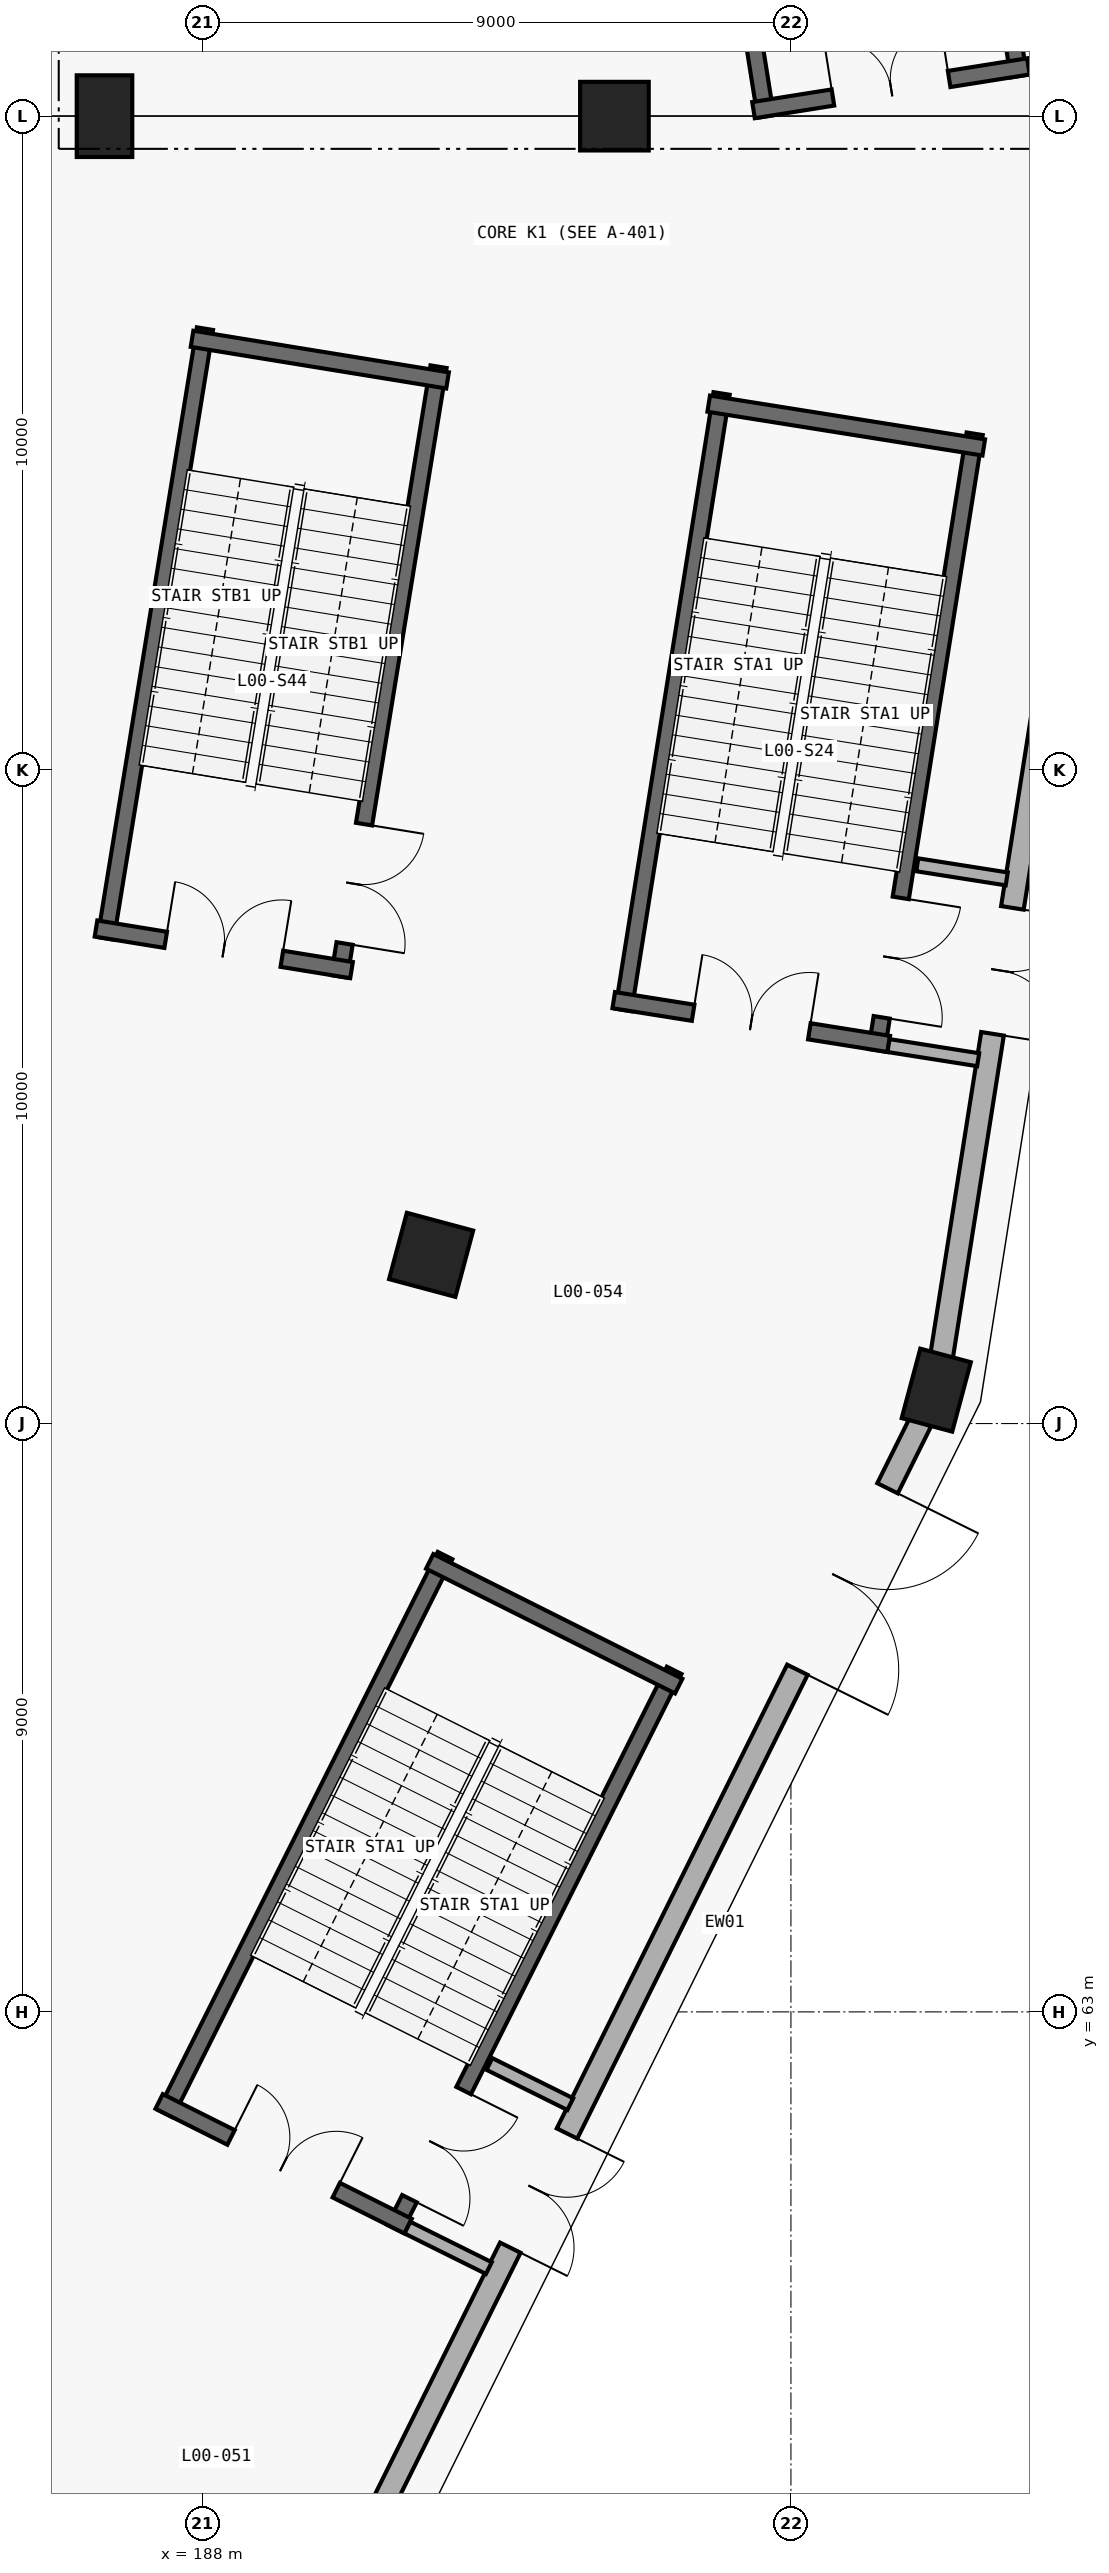
"""IFC4 building model, lengths in metres.
Left out: names, types, materials, properties, quantities, classifications, styles, units other than length and angle.
Written with IfcOpenShell. Run it as: python <this file> out.ifc"""

import sys

from ifc_helpers import new_model, si_unit, direction, frame, frame_2d, origin, origin_2d, place, context, subcontext, project, spatial, rectangle, extrude, element, fill, save


model = new_model("IFC4")
c1 = context("Model", 3, precision=1e-05, world=origin(), true_north=direction((0.0, 1.0)))
c2 = subcontext(c1, "Body", "Model", "MODEL_VIEW")
j1 = project(units=[si_unit("LENGTHUNIT", "METRE"), si_unit("PLANEANGLEUNIT", "RADIAN")], contexts=[c1])
p1 = place(None, origin())
s1 = spatial("IfcSite", under=j1, at=p1, CompositionType="ELEMENT")
p2 = place(p1, origin())
s2 = spatial("IfcBuilding", under=s1, at=p2, CompositionType="ELEMENT")
p3 = place(p2, origin())
s3 = spatial("IfcBuildingStorey", under=s2, at=p3, CompositionType="ELEMENT", Elevation=0.0)
p4 = place(p3, frame((186.5, 92.0, 0.0), z_axis=(0.0, 0.0, 1.0), x_axis=(1.0, 0.0, 0.0)))
e1 = element("IfcColumn", 1, at=p4, inside=s3, PredefinedType="COLUMN", context=c2, shape_type="SweptSolid", body=[
    extrude(rectangle(XDim=0.85, YDim=1.25, at=origin_2d()), origin(), (0.0, 0.0, 1.0), 5.4),
])
p5 = place(p3, frame((194.3, 92.0, 0.0), z_axis=(0.0, 0.0, 1.0), x_axis=(1.0, 0.0, 0.0)))
e2 = element("IfcColumn", 2, at=p5, inside=s3, PredefinedType="COLUMN", context=c2, shape_type="SweptSolid", body=[
    extrude(rectangle(XDim=1.05, YDim=1.05, at=origin_2d()), origin(), (0.0, 0.0, 1.0), 5.4),
])
p6 = place(p3, frame((199.223, 72.511, 0.0), z_axis=(0.0, 0.0, 1.0), x_axis=(-0.965925826289, 0.258819045103, 0.0)))
e3 = element("IfcColumn", 3, at=p6, inside=s3, PredefinedType="COLUMN", context=c2, shape_type="SweptSolid", body=[
    extrude(rectangle(XDim=0.8, YDim=1.1, at=origin_2d()), origin(), (0.0, 0.0, 1.0), 5.4),
])
p7 = place(p3, frame((191.496, 74.581, 0.0), z_axis=(0.0, 0.0, 1.0), x_axis=(-0.965925826289, 0.258819045103, 0.0)))
e4 = element("IfcColumn", 4, at=p7, inside=s3, PredefinedType="COLUMN", context=c2, shape_type="SweptSolid", body=[
    extrude(rectangle(XDim=1.05, YDim=1.05, at=origin_2d()), origin(), (0.0, 0.0, 1.0), 5.4),
])
p8 = place(p3, frame((199.305, 110.967, 0.0), z_axis=(0.0, 0.0, 1.0), x_axis=(0.155972645656, -0.987761374932, 0.0)))
e5 = element("IfcWall", 5, at=p8, inside=s3, PredefinedType="STANDARD", context=c2, shape_type="SweptSolid", body=[
    extrude(rectangle(XDim=18.671, YDim=0.35, at=frame_2d((9.335, 0.0))), origin(), (0.0, 0.0, 1.0), 4.165),
])
p9 = place(p8, frame((15.84, 0.0, 0.0)))
e6 = element("IfcOpeningElement", 6, at=p9, cuts=e5, PredefinedType="OPENING", context=c2, shape_type="SweptSolid", body=[
    extrude(rectangle(XDim=1.95, YDim=2.25, at=frame_2d((0.975, 1.125))), frame((0.0, 0.185, 0.0), z_axis=(0.0, -1.0, 0.0), x_axis=(1.0, 0.0, 0.0)), (0.0, 0.0, 1.0), 0.37),
])
p10 = place(p8, frame((2.681, 0.0, 0.0)))
e7 = element("IfcOpeningElement", 7, at=p10, cuts=e5, PredefinedType="OPENING", context=c2, shape_type="SweptSolid", body=[
    extrude(rectangle(XDim=3.6, YDim=2.7, at=frame_2d((1.8, 1.35))), frame((0.0, 0.185, 0.0), z_axis=(0.0, -1.0, 0.0), x_axis=(1.0, 0.0, 0.0)), (0.0, 0.0, 1.0), 0.37),
])
p11 = place(p3, frame((198.985, 72.031, 0.0), z_axis=(0.0, 0.0, 1.0), x_axis=(-0.444884558919, -0.895587923788, 0.0)))
e8 = element("IfcWall", 8, at=p11, inside=s3, PredefinedType="STANDARD", context=c2, shape_type="SweptSolid", body=[
    extrude(rectangle(XDim=19.216, YDim=0.35, at=frame_2d((9.608, 0.0))), origin(), (0.0, 0.0, 1.0), 4.165),
])
p12 = place(p11, frame((12.161, 0.0, 0.0)))
e9 = element("IfcOpeningElement", 9, at=p12, cuts=e8, PredefinedType="OPENING", context=c2, shape_type="SweptSolid", body=[
    extrude(rectangle(XDim=1.95, YDim=2.25, at=frame_2d((0.975, 1.125))), frame((0.0, 0.185, 0.0), z_axis=(0.0, -1.0, 0.0), x_axis=(1.0, 0.0, 0.0)), (0.0, 0.0, 1.0), 0.37),
])
p13 = place(p11, frame((1.14, 0.0, 0.0)))
e10 = element("IfcOpeningElement", 10, at=p13, cuts=e8, PredefinedType="OPENING", context=c2, shape_type="SweptSolid", body=[
    extrude(rectangle(XDim=3.1, YDim=2.58, at=frame_2d((1.55, 1.29))), frame((0.0, 0.185, 0.0), z_axis=(0.0, -1.0, 0.0), x_axis=(1.0, 0.0, 0.0)), (0.0, 0.0, 1.0), 0.37),
])
p14 = place(p3, frame((202.217, 91.475, 0.0), z_axis=(0.0, 0.0, 1.0), x_axis=(-0.155972645656, -0.987761374932, 0.0)))
e11 = element("IfcWall", 11, at=p14, inside=s3, PredefinedType="STANDARD", context=c2, shape_type="SweptSolid", body=[
    extrude(rectangle(XDim=18.671, YDim=0.35, at=frame_2d((9.335, 0.0))), origin(), (0.0, 0.0, 1.0), 4.165),
])
p15 = place(p14, frame((11.73, 0.0, 0.0)))
e12 = element("IfcOpeningElement", 12, at=p15, cuts=e11, PredefinedType="OPENING", context=c2, shape_type="SweptSolid", body=[
    extrude(rectangle(XDim=1.95, YDim=2.25, at=frame_2d((0.975, 1.125))), frame((0.0, 0.185, 0.0), z_axis=(0.0, -1.0, 0.0), x_axis=(1.0, 0.0, 0.0)), (0.0, 0.0, 1.0), 0.37),
])
p16 = place(p14, frame((1.164, 0.0, 0.0)))
e13 = element("IfcOpeningElement", 13, at=p16, cuts=e11, PredefinedType="OPENING", context=c2, shape_type="SweptSolid", body=[
    extrude(rectangle(XDim=2.9, YDim=2.52, at=frame_2d((1.45, 1.26))), frame((0.0, 0.185, 0.0), z_axis=(0.0, -1.0, 0.0), x_axis=(1.0, 0.0, 0.0)), (0.0, 0.0, 1.0), 0.37),
])
p17 = place(p3, frame((198.984, 102.043, 0.0), z_axis=(0.0, 0.0, 1.0), x_axis=(0.157268610044, -0.987555863886, 0.0)))
e14 = element("IfcWall", 14, at=p17, inside=s3, PredefinedType="SHEAR", context=c2, shape_type="SweptSolid", body=[
    extrude(rectangle(XDim=9.55, YDim=0.25, at=frame_2d((4.775, 0.0))), origin(), (0.0, 0.0, 1.0), 5.1),
])
p18 = place(p17, frame((7.19, 0.0, 0.0)))
e15 = element("IfcOpeningElement", 15, at=p18, cuts=e14, PredefinedType="OPENING", context=c2, shape_type="SweptSolid", body=[
    extrude(rectangle(XDim=1.85, YDim=2.3, at=frame_2d((0.925, 1.15))), frame((0.0, 0.135, 0.0), z_axis=(0.0, -1.0, 0.0), x_axis=(1.0, 0.0, 0.0)), (0.0, 0.0, 1.0), 0.27),
])
p19 = place(p3, frame((195.113, 101.427, 0.0), z_axis=(0.0, 0.0, 1.0), x_axis=(0.157243678356, -0.987559833943, 0.0)))
e16 = element("IfcWall", 16, at=p19, inside=s3, PredefinedType="SHEAR", context=c2, shape_type="SweptSolid", body=[
    extrude(rectangle(XDim=9.55, YDim=0.25, at=frame_2d((4.775, 0.0))), origin(), (0.0, 0.0, 1.0), 5.1),
])
p20 = place(p3, frame((196.427, 92.092, 0.0), z_axis=(0.0, 0.0, 1.0), x_axis=(0.987557660991, 0.157257324847, 0.0)))
e17 = element("IfcWall", 17, at=p20, inside=s3, PredefinedType="SHEAR", context=c2, shape_type="SweptSolid", body=[
    extrude(rectangle(XDim=4.26, YDim=0.25, at=frame_2d((2.13, 0.0))), origin(), (0.0, 0.0, 1.0), 5.1),
])
p21 = place(p20, frame((1.23, 0.0, 0.0)))
e18 = element("IfcOpeningElement", 18, at=p21, cuts=e17, PredefinedType="OPENING", context=c2, shape_type="SweptSolid", body=[
    extrude(rectangle(XDim=1.8, YDim=2.25, at=frame_2d((0.9, 1.125))), frame((0.0, 0.135, 0.0), z_axis=(0.0, -1.0, 0.0), x_axis=(1.0, 0.0, 0.0)), (0.0, 0.0, 1.0), 0.27),
])
p22 = place(p3, frame((195.214, 68.225, 0.0), z_axis=(0.0, 0.0, 1.0), x_axis=(-0.447919041961, -0.894074119885, 0.0)))
e19 = element("IfcWall", 19, at=p22, inside=s3, PredefinedType="SHEAR", context=c2, shape_type="SweptSolid", body=[
    extrude(rectangle(XDim=9.55, YDim=0.25, at=frame_2d((4.775, 0.0))), origin(), (0.0, 0.0, 1.0), 5.1),
])
p23 = place(p22, frame((7.19, 0.0, 0.0)))
e20 = element("IfcOpeningElement", 20, at=p23, cuts=e19, PredefinedType="OPENING", context=c2, shape_type="SweptSolid", body=[
    extrude(rectangle(XDim=1.85, YDim=2.3, at=frame_2d((0.925, 1.15))), frame((0.0, 0.135, 0.0), z_axis=(0.0, -1.0, 0.0), x_axis=(1.0, 0.0, 0.0)), (0.0, 0.0, 1.0), 0.27),
])
p24 = place(p3, frame((191.709, 69.981, 0.0), z_axis=(0.0, 0.0, 1.0), x_axis=(-0.4479088042, -0.894079248792, 0.0)))
e21 = element("IfcWall", 21, at=p24, inside=s3, PredefinedType="SHEAR", context=c2, shape_type="SweptSolid", body=[
    extrude(rectangle(XDim=9.55, YDim=0.25, at=frame_2d((4.775, 0.0))), origin(), (0.0, 0.0, 1.0), 5.1),
])
p25 = place(p3, frame((187.336, 61.63, 0.0), z_axis=(0.0, 0.0, 1.0), x_axis=(0.894071595331, -0.447924081092, 0.0)))
e22 = element("IfcWall", 22, at=p25, inside=s3, PredefinedType="SHEAR", context=c2, shape_type="SweptSolid", body=[
    extrude(rectangle(XDim=4.26, YDim=0.25, at=frame_2d((2.13, 0.0))), origin(), (0.0, 0.0, 1.0), 5.1),
])
p26 = place(p25, frame((1.23, 0.0, 0.0)))
e23 = element("IfcOpeningElement", 23, at=p26, cuts=e22, PredefinedType="OPENING", context=c2, shape_type="SweptSolid", body=[
    extrude(rectangle(XDim=1.8, YDim=2.25, at=frame_2d((0.9, 1.125))), frame((0.0, 0.135, 0.0), z_axis=(0.0, -1.0, 0.0), x_axis=(1.0, 0.0, 0.0)), (0.0, 0.0, 1.0), 0.27),
])
p27 = place(p3, frame((195.283, 67.984, 0.0), z_axis=(0.0, 0.0, 1.0), x_axis=(-0.894083048484, 0.447901219481, 0.0)))
e24 = element("IfcWall", 24, at=p27, inside=s3, PredefinedType="SHEAR", context=c2, shape_type="SweptSolid", body=[
    extrude(rectangle(XDim=4.26, YDim=0.25, at=frame_2d((2.13, 0.0))), origin(), (0.0, 0.0, 1.0), 5.1),
])
p28 = place(p3, frame((199.811, 87.142, 0.0), z_axis=(0.0, 0.0, 1.0), x_axis=(-0.157272580499, -0.987555231581, 0.0)))
e25 = element("IfcWall", 25, at=p28, inside=s3, PredefinedType="SHEAR", context=c2, shape_type="SweptSolid", body=[
    extrude(rectangle(XDim=9.55, YDim=0.25, at=frame_2d((4.775, 0.0))), origin(), (0.0, 0.0, 1.0), 5.1),
])
p29 = place(p28, frame((7.19, 0.0, 0.0)))
e26 = element("IfcOpeningElement", 26, at=p29, cuts=e25, PredefinedType="OPENING", context=c2, shape_type="SweptSolid", body=[
    extrude(rectangle(XDim=1.85, YDim=2.3, at=frame_2d((0.925, 1.15))), frame((0.0, 0.135, 0.0), z_axis=(0.0, -1.0, 0.0), x_axis=(1.0, 0.0, 0.0)), (0.0, 0.0, 1.0), 0.27),
])
p30 = place(p3, frame((195.939, 87.758, 0.0), z_axis=(0.0, 0.0, 1.0), x_axis=(-0.157247648214, -0.987559201836, 0.0)))
e27 = element("IfcWall", 27, at=p30, inside=s3, PredefinedType="SHEAR", context=c2, shape_type="SweptSolid", body=[
    extrude(rectangle(XDim=9.55, YDim=0.25, at=frame_2d((4.775, 0.0))), origin(), (0.0, 0.0, 1.0), 5.1),
])
p31 = place(p3, frame((194.289, 78.477, 0.0), z_axis=(0.0, 0.0, 1.0), x_axis=(0.987548759282, -0.157313216355, 0.0)))
e28 = element("IfcWall", 28, at=p31, inside=s3, PredefinedType="SHEAR", context=c2, shape_type="SweptSolid", body=[
    extrude(rectangle(XDim=4.26, YDim=0.25, at=frame_2d((2.13, 0.0))), origin(), (0.0, 0.0, 1.0), 5.1),
])
p32 = place(p31, frame((1.23, 0.0, 0.0)))
e29 = element("IfcOpeningElement", 29, at=p32, cuts=e28, PredefinedType="OPENING", context=c2, shape_type="SweptSolid", body=[
    extrude(rectangle(XDim=1.8, YDim=2.25, at=frame_2d((0.9, 1.125))), frame((0.0, 0.135, 0.0), z_axis=(0.0, -1.0, 0.0), x_axis=(1.0, 0.0, 0.0)), (0.0, 0.0, 1.0), 0.27),
])
p33 = place(p3, frame((199.949, 86.932, 0.0), z_axis=(0.0, 0.0, 1.0), x_axis=(-0.987556243614, 0.157266225551, 0.0)))
e30 = element("IfcWall", 30, at=p33, inside=s3, PredefinedType="SHEAR", context=c2, shape_type="SweptSolid", body=[
    extrude(rectangle(XDim=4.26, YDim=0.25, at=frame_2d((2.13, 0.0))), origin(), (0.0, 0.0, 1.0), 5.1),
])
p34 = place(p3, frame((191.609, 88.167, 0.0), z_axis=(0.0, 0.0, 1.0), x_axis=(-0.160694331821, -0.987004220721, 0.0)))
e31 = element("IfcWall", 31, at=p34, inside=s3, PredefinedType="SHEAR", context=c2, shape_type="SweptSolid", body=[
    extrude(rectangle(XDim=9.45, YDim=0.25, at=frame_2d((4.725, 0.0))), origin(), (0.0, 0.0, 1.0), 5.1),
])
p35 = place(p34, frame((7.09, 0.0, 0.0)))
e32 = element("IfcOpeningElement", 32, at=p35, cuts=e31, PredefinedType="OPENING", context=c2, shape_type="SweptSolid", body=[
    extrude(rectangle(XDim=1.85, YDim=2.3, at=frame_2d((0.925, 1.15))), frame((0.0, 0.135, 0.0), z_axis=(0.0, -1.0, 0.0), x_axis=(1.0, 0.0, 0.0)), (0.0, 0.0, 1.0), 0.27),
])
p36 = place(p3, frame((188.037, 88.749, 0.0), z_axis=(0.0, 0.0, 1.0), x_axis=(-0.160719499634, -0.987000122815, 0.0)))
e33 = element("IfcWall", 33, at=p36, inside=s3, PredefinedType="SHEAR", context=c2, shape_type="SweptSolid", body=[
    extrude(rectangle(XDim=9.45, YDim=0.25, at=frame_2d((4.725, 0.0))), origin(), (0.0, 0.0, 1.0), 5.1),
])
p37 = place(p3, frame((186.37, 79.573, 0.0), z_axis=(0.0, 0.0, 1.0), x_axis=(0.987008406822, -0.160668618163, 0.0)))
e34 = element("IfcWall", 34, at=p37, inside=s3, PredefinedType="SHEAR", context=c2, shape_type="SweptSolid", body=[
    extrude(rectangle(XDim=3.96, YDim=0.25, at=frame_2d((1.98, 0.0))), origin(), (0.0, 0.0, 1.0), 5.1),
])
p38 = place(p37, frame((1.08, 0.0, 0.0)))
e35 = element("IfcOpeningElement", 35, at=p38, cuts=e34, PredefinedType="OPENING", context=c2, shape_type="SweptSolid", body=[
    extrude(rectangle(XDim=1.8, YDim=2.25, at=frame_2d((0.9, 1.125))), frame((0.0, 0.135, 0.0), z_axis=(0.0, -1.0, 0.0), x_axis=(1.0, 0.0, 0.0)), (0.0, 0.0, 1.0), 0.27),
])
p39 = place(p3, frame((191.748, 87.958, 0.0), z_axis=(0.0, 0.0, 1.0), x_axis=(-0.987008406822, 0.160668618163, 0.0)))
e36 = element("IfcWall", 36, at=p39, inside=s3, PredefinedType="SHEAR", context=c2, shape_type="SweptSolid", body=[
    extrude(rectangle(XDim=3.96, YDim=0.25, at=frame_2d((1.98, 0.0))), origin(), (0.0, 0.0, 1.0), 5.1),
])
p40 = place(p3, frame((200.638, 92.737, 0.0), z_axis=(0.0, 0.0, 1.0), x_axis=(0.987762965329, 0.155962573473, 0.0)))
e37 = element("IfcWall", 37, at=p40, inside=s3, PredefinedType="PARTITIONING", context=c2, shape_type="SweptSolid", body=[
    extrude(rectangle(XDim=1.371, YDim=0.2, at=frame_2d((0.686, 0.0))), origin(), (0.0, 0.0, 1.0), 4.165),
])
p41 = place(p3, frame((191.133, 59.7, 0.0), z_axis=(0.0, 0.0, 1.0), x_axis=(0.895547753185, -0.444965416371, 0.0)))
e38 = element("IfcWall", 38, at=p41, inside=s3, PredefinedType="PARTITIONING", context=c2, shape_type="SweptSolid", body=[
    extrude(rectangle(XDim=1.391, YDim=0.2, at=frame_2d((0.695, 0.0))), origin(), (0.0, 0.0, 1.0), 4.165),
])
p42 = place(p3, frame((192.387, 62.203, 0.0), z_axis=(0.0, 0.0, 1.0), x_axis=(0.895731004012, -0.44459641075, 0.0)))
e39 = element("IfcWall", 39, at=p42, inside=s3, PredefinedType="PARTITIONING", context=c2, shape_type="SweptSolid", body=[
    extrude(rectangle(XDim=1.382, YDim=0.2, at=frame_2d((0.691, 0.0))), origin(), (0.0, 0.0, 1.0), 4.165),
])
p43 = place(p3, frame((198.492, 77.782, 0.0), z_axis=(0.0, 0.0, 1.0), x_axis=(0.987768665993, -0.155926464982, 0.0)))
e40 = element("IfcWall", 40, at=p43, inside=s3, PredefinedType="PARTITIONING", context=c2, shape_type="SweptSolid", body=[
    extrude(rectangle(XDim=1.389, YDim=0.2, at=frame_2d((0.694, 0.0))), origin(), (0.0, 0.0, 1.0), 4.165),
])
p44 = place(p3, frame((198.933, 80.548, 0.0), z_axis=(0.0, 0.0, 1.0), x_axis=(0.987817205995, -0.155618660641, 0.0)))
e41 = element("IfcWall", 41, at=p44, inside=s3, PredefinedType="PARTITIONING", context=c2, shape_type="SweptSolid", body=[
    extrude(rectangle(XDim=1.385, YDim=0.2, at=frame_2d((0.693, 0.0))), origin(), (0.0, 0.0, 1.0), 4.165),
])
p45 = place(p12, origin())
e42 = element("IfcDoor", 42, at=p45, inside=s3, OperationType="DOUBLE_DOOR_SINGLE_SWING", PredefinedType="DOOR", context=c2, shape_type="SweptSolid", body=[
    extrude(rectangle(XDim=1.95, YDim=2.25, at=frame_2d((0.975, 1.125))), frame((0.0, 0.025, 0.0), z_axis=(0.0, -1.0, 0.0), x_axis=(1.0, 0.0, 0.0)), (0.0, 0.0, 1.0), 0.05),
])
fill(e9, e42)
p46 = place(p13, origin())
e43 = element("IfcDoor", 43, at=p46, inside=s3, OperationType="DOUBLE_DOOR_SINGLE_SWING", PredefinedType="DOOR", context=c2, shape_type="SweptSolid", body=[
    extrude(rectangle(XDim=3.1, YDim=2.58, at=frame_2d((1.55, 1.29))), frame((0.0, 0.025, 0.0), z_axis=(0.0, -1.0, 0.0), x_axis=(1.0, 0.0, 0.0)), (0.0, 0.0, 1.0), 0.05),
])
fill(e10, e43)
p47 = place(p15, origin())
e44 = element("IfcDoor", 44, at=p47, inside=s3, OperationType="DOUBLE_DOOR_SINGLE_SWING", PredefinedType="DOOR", context=c2, shape_type="SweptSolid", body=[
    extrude(rectangle(XDim=1.95, YDim=2.25, at=frame_2d((0.975, 1.125))), frame((0.0, 0.025, 0.0), z_axis=(0.0, -1.0, 0.0), x_axis=(1.0, 0.0, 0.0)), (0.0, 0.0, 1.0), 0.05),
])
fill(e12, e44)
p48 = place(p21, origin())
e45 = element("IfcDoor", 45, at=p48, inside=s3, OperationType="DOUBLE_DOOR_SINGLE_SWING", PredefinedType="DOOR", context=c2, shape_type="SweptSolid", body=[
    extrude(rectangle(XDim=1.8, YDim=2.25, at=frame_2d((0.9, 1.125))), frame((0.0, 0.025, 0.0), z_axis=(0.0, -1.0, 0.0), x_axis=(1.0, 0.0, 0.0)), (0.0, 0.0, 1.0), 0.05),
])
fill(e18, e45)
p49 = place(p26, origin())
e46 = element("IfcDoor", 46, at=p49, inside=s3, OperationType="DOUBLE_DOOR_SINGLE_SWING", PredefinedType="DOOR", context=c2, shape_type="SweptSolid", body=[
    extrude(rectangle(XDim=1.8, YDim=2.25, at=frame_2d((0.9, 1.125))), frame((0.0, 0.025, 0.0), z_axis=(0.0, -1.0, 0.0), x_axis=(1.0, 0.0, 0.0)), (0.0, 0.0, 1.0), 0.05),
])
fill(e23, e46)
p50 = place(p23, origin())
e47 = element("IfcDoor", 47, at=p50, inside=s3, OperationType="DOUBLE_DOOR_SINGLE_SWING", PredefinedType="DOOR", context=c2, shape_type="SweptSolid", body=[
    extrude(rectangle(XDim=1.85, YDim=2.3, at=frame_2d((0.925, 1.15))), frame((0.0, 0.025, 0.0), z_axis=(0.0, -1.0, 0.0), x_axis=(1.0, 0.0, 0.0)), (0.0, 0.0, 1.0), 0.05),
])
fill(e20, e47)
p51 = place(p32, origin())
e48 = element("IfcDoor", 48, at=p51, inside=s3, OperationType="DOUBLE_DOOR_SINGLE_SWING", PredefinedType="DOOR", context=c2, shape_type="SweptSolid", body=[
    extrude(rectangle(XDim=1.8, YDim=2.25, at=frame_2d((0.9, 1.125))), frame((0.0, 0.025, 0.0), z_axis=(0.0, -1.0, 0.0), x_axis=(1.0, 0.0, 0.0)), (0.0, 0.0, 1.0), 0.05),
])
fill(e29, e48)
p52 = place(p29, origin())
e49 = element("IfcDoor", 49, at=p52, inside=s3, OperationType="DOUBLE_DOOR_SINGLE_SWING", PredefinedType="DOOR", context=c2, shape_type="SweptSolid", body=[
    extrude(rectangle(XDim=1.85, YDim=2.3, at=frame_2d((0.925, 1.15))), frame((0.0, 0.025, 0.0), z_axis=(0.0, -1.0, 0.0), x_axis=(1.0, 0.0, 0.0)), (0.0, 0.0, 1.0), 0.05),
])
fill(e26, e49)
p53 = place(p38, origin())
e50 = element("IfcDoor", 50, at=p53, inside=s3, OperationType="DOUBLE_DOOR_SINGLE_SWING", PredefinedType="DOOR", context=c2, shape_type="SweptSolid", body=[
    extrude(rectangle(XDim=1.8, YDim=2.25, at=frame_2d((0.9, 1.125))), frame((0.0, 0.025, 0.0), z_axis=(0.0, -1.0, 0.0), x_axis=(1.0, 0.0, 0.0)), (0.0, 0.0, 1.0), 0.05),
])
fill(e35, e50)
p54 = place(p35, origin())
e51 = element("IfcDoor", 51, at=p54, inside=s3, OperationType="DOUBLE_DOOR_SINGLE_SWING", PredefinedType="DOOR", context=c2, shape_type="SweptSolid", body=[
    extrude(rectangle(XDim=1.85, YDim=2.3, at=frame_2d((0.925, 1.15))), frame((0.0, 0.025, 0.0), z_axis=(0.0, -1.0, 0.0), x_axis=(1.0, 0.0, 0.0)), (0.0, 0.0, 1.0), 0.05),
])
fill(e32, e51)
save(model, sys.argv[1])
